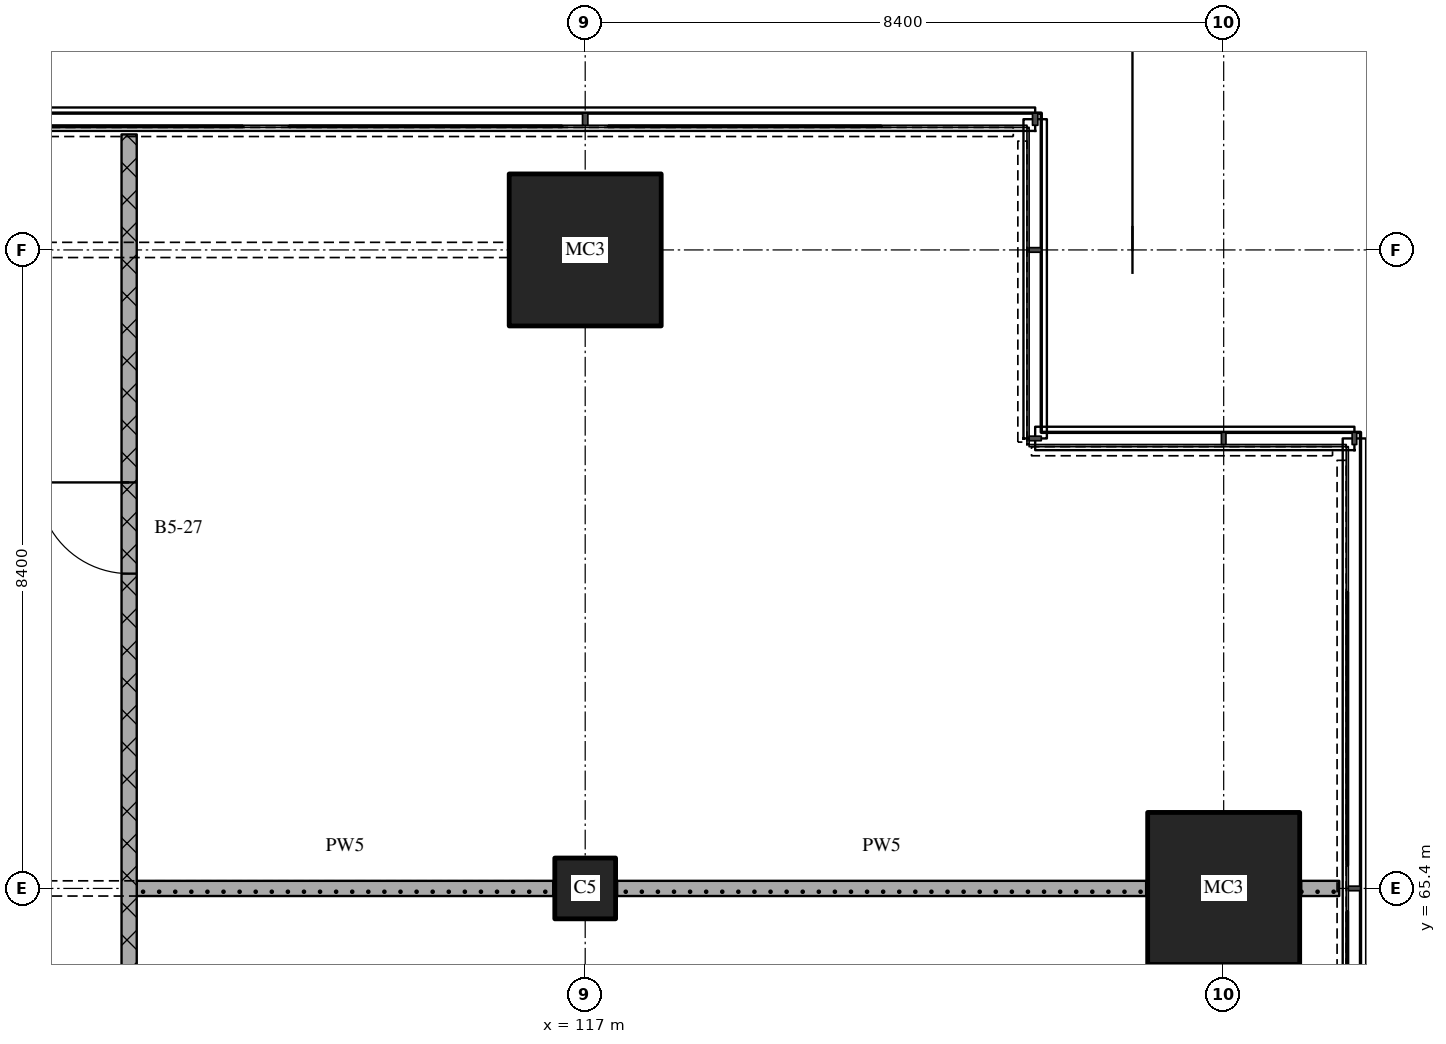
"""IFC4 building model, lengths in metres.
Left out: names, types, materials, properties, quantities, classifications, styles, units other than length and angle.
Written with IfcOpenShell. Run it as: python <this file> out.ifc"""

import sys

from ifc_helpers import new_model, si_unit, direction, frame, frame_2d, origin, origin_2d, place, context, subcontext, project, spatial, rectangle, extrude, element, fill, save


model = new_model("IFC4")
c1 = context("Model", 3, precision=1e-05, world=origin(), true_north=direction((0.0, 1.0)))
c2 = subcontext(c1, "Body", "Model", "MODEL_VIEW")
j1 = project(units=[si_unit("LENGTHUNIT", "METRE"), si_unit("PLANEANGLEUNIT", "RADIAN")], contexts=[c1])
p1 = place(None, origin())
s1 = spatial("IfcSite", under=j1, at=p1, CompositionType="ELEMENT")
p2 = place(p1, origin())
s2 = spatial("IfcBuilding", under=s1, at=p2, CompositionType="ELEMENT")
p3 = place(p2, frame((0.0, 0.0, 138.45)))
s3 = spatial("IfcBuildingStorey", under=s2, at=p3, CompositionType="ELEMENT", Elevation=138.45)
p4 = place(p3, frame((117.0, 65.4, 0.0), z_axis=(0.0, 0.0, 1.0), x_axis=(1.0, 0.0, 0.0)))
e1 = element("IfcColumn", 1, at=p4, inside=s3, PredefinedType="COLUMN", context=c2, shape_type="SweptSolid", body=[
    extrude(rectangle(XDim=0.8, YDim=0.8, at=origin_2d()), origin(), (0.0, 0.0, 1.0), 3.6),
])
for number, where, z_axis, x_axis in (
    (2, (117.0, 73.8, 0.0), (0.0, 0.0, 1.0), (1.0, 0.0, 0.0)),
    (3, (125.4, 65.4, 0.0), (0.0, 0.0, 1.0), (1.0, 0.0, 0.0)),
):
    element("IfcColumn", number, at=place(p3, frame(where, z_axis=z_axis, x_axis=x_axis)), inside=s3, PredefinedType="COLUMN", context=c2, shape_type="SweptSolid", body=[
        extrude(rectangle(XDim=2.0, YDim=2.0, at=origin_2d()), origin(), (0.0, 0.0, 1.0), 3.6),
    ])
p5 = place(p3, frame((111.1, 65.4, 0.0), z_axis=(0.0, 0.0, 1.0), x_axis=(1.0, 0.0, 0.0)))
e4 = element("IfcWall", 4, at=p5, inside=s3, PredefinedType="PARTITIONING", context=c2, shape_type="SweptSolid", body=[
    extrude(rectangle(XDim=5.48, YDim=0.2, at=frame_2d((2.74, 0.0))), origin(), (0.0, 0.0, 1.0), 2.9),
])
p6 = place(p3, frame((117.42, 65.4, 0.0), z_axis=(0.0, 0.0, 1.0), x_axis=(1.0, 0.0, 0.0)))
e5 = element("IfcWall", 5, at=p6, inside=s3, PredefinedType="PARTITIONING", context=c2, shape_type="SweptSolid", body=[
    extrude(rectangle(XDim=6.96, YDim=0.2, at=frame_2d((3.48, 0.0))), origin(), (0.0, 0.0, 1.0), 3.3),
])
p7 = place(p3, frame((126.42, 65.4, 0.0), z_axis=(0.0, 0.0, 1.0), x_axis=(1.0, 0.0, 0.0)))
e6 = element("IfcWall", 6, at=p7, inside=s3, PredefinedType="PARTITIONING", context=c2, shape_type="SweptSolid", body=[
    extrude(rectangle(XDim=0.5, YDim=0.2, at=frame_2d((0.25, 0.0))), origin(), (0.0, 0.0, 1.0), 3.3),
])
p8 = place(p3, frame((111.0, 75.32, 0.0), z_axis=(0.0, 0.0, 1.0), x_axis=(0.0, -1.0, 0.0)))
e7 = element("IfcWall", 7, at=p8, inside=s3, PredefinedType="PARTITIONING", context=c2, shape_type="SweptSolid", body=[
    extrude(rectangle(XDim=32.02, YDim=0.2, at=frame_2d((16.01, 0.0))), origin(), (0.0, 0.0, 1.0), 3.3),
])
p9 = place(p8, frame((4.579, 0.0, 0.0)))
e8 = element("IfcOpeningElement", 8, at=p9, cuts=e7, PredefinedType="OPENING", context=c2, shape_type="SweptSolid", body=[
    extrude(rectangle(XDim=1.2, YDim=2.1, at=frame_2d((0.6, 1.05))), frame((0.0, 0.11, 0.0), z_axis=(0.0, -1.0, 0.0), x_axis=(1.0, 0.0, 0.0)), (0.0, 0.0, 1.0), 0.22),
])
p10 = place(p8, frame((13.52, 0.0, 0.0)))
e9 = element("IfcOpeningElement", 9, at=p10, cuts=e7, PredefinedType="OPENING", context=c2, shape_type="SweptSolid", body=[
    extrude(rectangle(XDim=1.2, YDim=2.1, at=frame_2d((0.6, 1.05))), frame((0.0, 0.11, 0.0), z_axis=(0.0, -1.0, 0.0), x_axis=(1.0, 0.0, 0.0)), (0.0, 0.0, 1.0), 0.22),
])
p11 = place(p8, frame((23.27, 0.0, 0.0)))
e10 = element("IfcOpeningElement", 10, at=p11, cuts=e7, PredefinedType="OPENING", context=c2, shape_type="SweptSolid", body=[
    extrude(rectangle(XDim=1.2, YDim=2.1, at=frame_2d((0.6, 1.05))), frame((0.0, 0.11, 0.0), z_axis=(0.0, -1.0, 0.0), x_axis=(1.0, 0.0, 0.0)), (0.0, 0.0, 1.0), 0.22),
])
p12 = place(p9, origin())
e11 = element("IfcDoor", 11, at=p12, inside=s3, OperationType="SINGLE_SWING_RIGHT", PredefinedType="DOOR", context=c2, shape_type="SweptSolid", body=[
    extrude(rectangle(XDim=1.2, YDim=2.1, at=frame_2d((0.6, 1.05))), frame((0.0, 0.025, 0.0), z_axis=(0.0, -1.0, 0.0), x_axis=(1.0, 0.0, 0.0)), (0.0, 0.0, 1.0), 0.05),
])
fill(e8, e11)
save(model, sys.argv[1])
